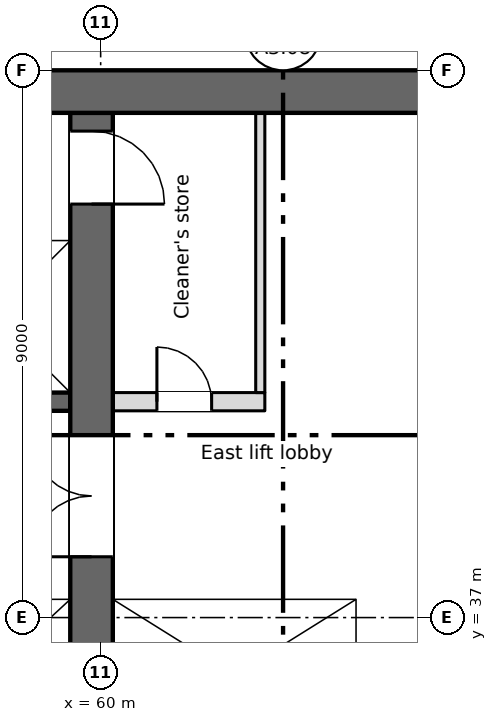
"""IFC4 building model, lengths in metres.
Left out: names, types, materials, properties, quantities, classifications, styles, units other than length and angle.
Written with IfcOpenShell. Run it as: python <this file> out.ifc"""

import sys

from ifc_helpers import new_model, si_unit, direction, frame, frame_2d, origin, place, context, subcontext, project, spatial, rectangle, extrude, element, fill, save


model = new_model("IFC4")
c1 = context("Model", 3, precision=1e-05, world=origin(), true_north=direction((0.0, 1.0)))
c2 = subcontext(c1, "Body", "Model", "MODEL_VIEW")
j1 = project(units=[si_unit("LENGTHUNIT", "METRE"), si_unit("PLANEANGLEUNIT", "RADIAN")], contexts=[c1])
p1 = place(None, origin())
s1 = spatial("IfcSite", under=j1, at=p1, CompositionType="ELEMENT")
p2 = place(p1, origin())
s2 = spatial("IfcBuilding", under=s1, at=p2, CompositionType="ELEMENT")
p3 = place(p2, frame((0.0, 0.0, 211.75)))
s3 = spatial("IfcBuildingStorey", under=s2, at=p3, CompositionType="ELEMENT", Elevation=211.75)
p4 = place(p3, frame((11.55, 45.65, 0.0), z_axis=(0.0, 0.0, 1.0), x_axis=(1.0, 0.0, 0.0)))
e1 = element("IfcWall", 1, at=p4, inside=s3, PredefinedType="SHEAR", context=c2, shape_type="SweptSolid", body=[
    extrude(rectangle(XDim=54.9, YDim=0.7, at=frame_2d((27.45, 0.0))), origin(), (0.0, 0.0, 1.0), 3.35),
])
p5 = place(p3, frame((64.35, 34.8, 0.0), z_axis=(0.0, 0.0, 1.0), x_axis=(0.0, 1.0, 0.0)))
e2 = element("IfcWall", 2, at=p5, inside=s3, PredefinedType="SHEAR", context=c2, shape_type="SweptSolid", body=[
    extrude(rectangle(XDim=10.5, YDim=0.3, at=frame_2d((5.25, 0.0))), origin(), (0.0, 0.0, 1.0), 3.35),
])
p6 = place(p3, frame((59.85, 28.4, 0.0), z_axis=(0.0, 0.0, 1.0), x_axis=(0.0, 1.0, 0.0)))
e3 = element("IfcWall", 3, at=p6, inside=s3, PredefinedType="SHEAR", context=c2, shape_type="SweptSolid", body=[
    extrude(rectangle(XDim=16.9, YDim=0.7, at=frame_2d((8.45, 0.0))), origin(), (0.0, 0.0, 1.0), 3.35),
])
p7 = place(p6, frame((9.6, 0.0, 0.0)))
e4 = element("IfcOpeningElement", 4, at=p7, cuts=e3, PredefinedType="OPENING", context=c2, shape_type="SweptSolid", body=[
    extrude(rectangle(XDim=2.0, YDim=2.1, at=frame_2d((1.0, 1.05))), frame((0.0, 0.36, 0.0), z_axis=(0.0, -1.0, 0.0), x_axis=(1.0, 0.0, 0.0)), (0.0, 0.0, 1.0), 0.72),
])
p8 = place(p6, frame((15.4, 0.0, 0.0)))
e5 = element("IfcOpeningElement", 5, at=p8, cuts=e3, PredefinedType="OPENING", context=c2, shape_type="SweptSolid", body=[
    extrude(rectangle(XDim=1.2, YDim=2.1, at=frame_2d((0.6, 1.05))), frame((0.0, 0.36, 0.0), z_axis=(0.0, -1.0, 0.0), x_axis=(1.0, 0.0, 0.0)), (0.0, 0.0, 1.0), 0.72),
])
p9 = place(p3, frame((47.3, 37.45, 0.0), z_axis=(0.0, 0.0, 1.0), x_axis=(1.0, 0.0, 0.0)))
e6 = element("IfcWall", 6, at=p9, inside=s3, PredefinedType="SHEAR", context=c2, shape_type="SweptSolid", body=[
    extrude(rectangle(XDim=12.2, YDim=0.3, at=frame_2d((6.1, 0.0))), origin(), (0.0, 0.0, 1.0), 3.35),
])
p10 = place(p9, frame((4.3, 0.0, 0.0)))
e7 = element("IfcOpeningElement", 7, at=p10, cuts=e6, PredefinedType="OPENING", context=c2, shape_type="SweptSolid", body=[
    extrude(rectangle(XDim=1.1, YDim=2.1, at=frame_2d((0.55, 1.05))), frame((0.0, 0.16, 0.0), z_axis=(0.0, -1.0, 0.0), x_axis=(1.0, 0.0, 0.0)), (0.0, 0.0, 1.0), 0.32),
])
p11 = place(p9, frame((7.3, 0.0, 0.0)))
e8 = element("IfcOpeningElement", 8, at=p11, cuts=e6, PredefinedType="OPENING", context=c2, shape_type="SweptSolid", body=[
    extrude(rectangle(XDim=1.1, YDim=2.1, at=frame_2d((0.55, 1.05))), frame((0.0, 0.16, 0.0), z_axis=(0.0, -1.0, 0.0), x_axis=(1.0, 0.0, 0.0)), (0.0, 0.0, 1.0), 0.32),
])
p12 = place(p9, frame((10.3, 0.0, 0.0)))
e9 = element("IfcOpeningElement", 9, at=p12, cuts=e6, PredefinedType="OPENING", context=c2, shape_type="SweptSolid", body=[
    extrude(rectangle(XDim=1.1, YDim=2.1, at=frame_2d((0.55, 1.05))), frame((0.0, 0.16, 0.0), z_axis=(0.0, -1.0, 0.0), x_axis=(1.0, 0.0, 0.0)), (0.0, 0.0, 1.0), 0.32),
])
p13 = place(p3, frame((60.2, 37.45, 0.0), z_axis=(0.0, 0.0, 1.0), x_axis=(1.0, 0.0, 0.0)))
e10 = element("IfcWall", 10, at=p13, inside=s3, PredefinedType="SHEAR", context=c2, shape_type="SweptSolid", body=[
    extrude(rectangle(XDim=4.0, YDim=0.3, at=frame_2d((2.0, 0.0))), origin(), (0.0, 0.0, 1.0), 3.35),
])
p14 = place(p13, frame((1.45, 0.0, 0.0)))
e11 = element("IfcOpeningElement", 11, at=p14, cuts=e10, PredefinedType="OPENING", context=c2, shape_type="SweptSolid", body=[
    extrude(rectangle(XDim=1.1, YDim=2.1, at=frame_2d((0.55, 1.05))), frame((0.0, 0.16, 0.0), z_axis=(0.0, -1.0, 0.0), x_axis=(1.0, 0.0, 0.0)), (0.0, 0.0, 1.0), 0.32),
])
p15 = place(p3, frame((18.5, 40.55, 0.0), z_axis=(0.0, 0.0, 1.0), x_axis=(1.0, 0.0, 0.0)))
e12 = element("IfcWall", 12, at=p15, inside=s3, PredefinedType="SHEAR", context=c2, shape_type="SweptSolid", body=[
    extrude(rectangle(XDim=41.0, YDim=0.3, at=frame_2d((20.5, 0.0))), origin(), (0.0, 0.0, 1.0), 3.35),
])
p16 = place(p15, frame((2.15, 0.0, 0.0)))
e13 = element("IfcOpeningElement", 13, at=p16, cuts=e12, PredefinedType="OPENING", context=c2, shape_type="SweptSolid", body=[
    extrude(rectangle(XDim=0.9, YDim=2.1, at=frame_2d((0.45, 1.05))), frame((0.0, 0.16, 0.0), z_axis=(0.0, -1.0, 0.0), x_axis=(1.0, 0.0, 0.0)), (0.0, 0.0, 1.0), 0.32),
])
p17 = place(p15, frame((15.9, 0.0, 0.0)))
e14 = element("IfcOpeningElement", 14, at=p17, cuts=e12, PredefinedType="OPENING", context=c2, shape_type="SweptSolid", body=[
    extrude(rectangle(XDim=0.9, YDim=2.1, at=frame_2d((0.45, 1.05))), frame((0.0, 0.16, 0.0), z_axis=(0.0, -1.0, 0.0), x_axis=(1.0, 0.0, 0.0)), (0.0, 0.0, 1.0), 0.32),
])
p18 = place(p15, frame((21.4, 0.0, 0.0)))
e15 = element("IfcOpeningElement", 15, at=p18, cuts=e12, PredefinedType="OPENING", context=c2, shape_type="SweptSolid", body=[
    extrude(rectangle(XDim=0.9, YDim=2.1, at=frame_2d((0.45, 1.05))), frame((0.0, 0.16, 0.0), z_axis=(0.0, -1.0, 0.0), x_axis=(1.0, 0.0, 0.0)), (0.0, 0.0, 1.0), 0.32),
])
p19 = place(p15, frame((26.9, 0.0, 0.0)))
e16 = element("IfcOpeningElement", 16, at=p19, cuts=e12, PredefinedType="OPENING", context=c2, shape_type="SweptSolid", body=[
    extrude(rectangle(XDim=0.9, YDim=2.1, at=frame_2d((0.45, 1.05))), frame((0.0, 0.16, 0.0), z_axis=(0.0, -1.0, 0.0), x_axis=(1.0, 0.0, 0.0)), (0.0, 0.0, 1.0), 0.32),
])
p20 = place(p15, frame((6.175, 0.0, 0.0)))
e17 = element("IfcOpeningElement", 17, at=p20, cuts=e12, PredefinedType="OPENING", context=c2, shape_type="SweptSolid", body=[
    extrude(rectangle(XDim=1.1, YDim=2.1, at=frame_2d((0.55, 1.05))), frame((0.0, 0.16, 0.0), z_axis=(0.0, -1.0, 0.0), x_axis=(1.0, 0.0, 0.0)), (0.0, 0.0, 1.0), 0.32),
])
p21 = place(p15, frame((8.925, 0.0, 0.0)))
e18 = element("IfcOpeningElement", 18, at=p21, cuts=e12, PredefinedType="OPENING", context=c2, shape_type="SweptSolid", body=[
    extrude(rectangle(XDim=1.1, YDim=2.1, at=frame_2d((0.55, 1.05))), frame((0.0, 0.16, 0.0), z_axis=(0.0, -1.0, 0.0), x_axis=(1.0, 0.0, 0.0)), (0.0, 0.0, 1.0), 0.32),
])
p22 = place(p15, frame((11.675, 0.0, 0.0)))
e19 = element("IfcOpeningElement", 19, at=p22, cuts=e12, PredefinedType="OPENING", context=c2, shape_type="SweptSolid", body=[
    extrude(rectangle(XDim=1.1, YDim=2.1, at=frame_2d((0.55, 1.05))), frame((0.0, 0.16, 0.0), z_axis=(0.0, -1.0, 0.0), x_axis=(1.0, 0.0, 0.0)), (0.0, 0.0, 1.0), 0.32),
])
p23 = place(p15, frame((30.925, 0.0, 0.0)))
e20 = element("IfcOpeningElement", 20, at=p23, cuts=e12, PredefinedType="OPENING", context=c2, shape_type="SweptSolid", body=[
    extrude(rectangle(XDim=1.1, YDim=2.1, at=frame_2d((0.55, 1.05))), frame((0.0, 0.16, 0.0), z_axis=(0.0, -1.0, 0.0), x_axis=(1.0, 0.0, 0.0)), (0.0, 0.0, 1.0), 0.32),
])
p24 = place(p15, frame((33.675, 0.0, 0.0)))
e21 = element("IfcOpeningElement", 21, at=p24, cuts=e12, PredefinedType="OPENING", context=c2, shape_type="SweptSolid", body=[
    extrude(rectangle(XDim=1.1, YDim=2.1, at=frame_2d((0.55, 1.05))), frame((0.0, 0.16, 0.0), z_axis=(0.0, -1.0, 0.0), x_axis=(1.0, 0.0, 0.0)), (0.0, 0.0, 1.0), 0.32),
])
p25 = place(p15, frame((36.375, 0.0, 0.0)))
e22 = element("IfcOpeningElement", 22, at=p25, cuts=e12, PredefinedType="OPENING", context=c2, shape_type="SweptSolid", body=[
    extrude(rectangle(XDim=1.2, YDim=2.1, at=frame_2d((0.6, 1.05))), frame((0.0, 0.16, 0.0), z_axis=(0.0, -1.0, 0.0), x_axis=(1.0, 0.0, 0.0)), (0.0, 0.0, 1.0), 0.32),
])
p26 = place(p15, frame((39.15, 0.0, 0.0)))
e23 = element("IfcOpeningElement", 23, at=p26, cuts=e12, PredefinedType="OPENING", context=c2, shape_type="SweptSolid", body=[
    extrude(rectangle(XDim=1.2, YDim=2.1, at=frame_2d((0.6, 1.05))), frame((0.0, 0.16, 0.0), z_axis=(0.0, -1.0, 0.0), x_axis=(1.0, 0.0, 0.0)), (0.0, 0.0, 1.0), 0.32),
])
p27 = place(p3, frame((18.5, 43.35, 0.0), z_axis=(0.0, 0.0, 1.0), x_axis=(1.0, 0.0, 0.0)))
e24 = element("IfcWall", 24, at=p27, inside=s3, PredefinedType="SHEAR", context=c2, shape_type="SweptSolid", body=[
    extrude(rectangle(XDim=41.0, YDim=0.3, at=frame_2d((20.5, 0.0))), origin(), (0.0, 0.0, 1.0), 3.35),
])
p28 = place(p3, frame((60.2, 40.55, 0.0), z_axis=(0.0, 0.0, 1.0), x_axis=(1.0, 0.0, 0.0)))
e25 = element("IfcWall", 25, at=p28, inside=s3, PredefinedType="PARTITIONING", context=c2, shape_type="SweptSolid", body=[
    extrude(rectangle(XDim=2.5, YDim=0.3, at=frame_2d((1.25, 0.0))), origin(), (0.0, 0.0, 1.0), 3.35),
])
p29 = place(p28, frame((0.725, 0.0, 0.0)))
e26 = element("IfcOpeningElement", 26, at=p29, cuts=e25, PredefinedType="OPENING", context=c2, shape_type="SweptSolid", body=[
    extrude(rectangle(XDim=0.9, YDim=2.1, at=frame_2d((0.45, 1.05))), frame((0.0, 0.16, 0.0), z_axis=(0.0, -1.0, 0.0), x_axis=(1.0, 0.0, 0.0)), (0.0, 0.0, 1.0), 0.32),
])
p30 = place(p3, frame((62.625, 40.7, 0.0), z_axis=(0.0, 0.0, 1.0), x_axis=(0.0, 1.0, 0.0)))
e27 = element("IfcWall", 27, at=p30, inside=s3, PredefinedType="PARTITIONING", context=c2, shape_type="SweptSolid", body=[
    extrude(rectangle(XDim=4.6, YDim=0.15, at=frame_2d((2.3, 0.0))), origin(), (0.0, 0.0, 1.0), 3.35),
])
p31 = place(p29, origin())
e28 = element("IfcDoor", 28, at=p31, inside=s3, OperationType="SINGLE_SWING_LEFT", PredefinedType="DOOR", context=c2, shape_type="SweptSolid", body=[
    extrude(rectangle(XDim=0.9, YDim=2.1, at=frame_2d((0.45, 1.05))), frame((0.0, 0.025, 0.0), z_axis=(0.0, -1.0, 0.0), x_axis=(1.0, 0.0, 0.0)), (0.0, 0.0, 1.0), 0.05),
])
fill(e26, e28)
p32 = place(p14, origin())
e29 = element("IfcDoor", 29, at=p32, inside=s3, OperationType="SLIDING_TO_LEFT", PredefinedType="DOOR", context=c2, shape_type="SweptSolid", body=[
    extrude(rectangle(XDim=1.1, YDim=2.1, at=frame_2d((0.55, 1.05))), frame((0.0, 0.025, 0.0), z_axis=(0.0, -1.0, 0.0), x_axis=(1.0, 0.0, 0.0)), (0.0, 0.0, 1.0), 0.05),
])
fill(e11, e29)
p33 = place(p7, origin())
e30 = element("IfcDoor", 30, at=p33, inside=s3, OperationType="DOUBLE_DOOR_SINGLE_SWING", PredefinedType="DOOR", context=c2, shape_type="SweptSolid", body=[
    extrude(rectangle(XDim=2.0, YDim=2.1, at=frame_2d((1.0, 1.05))), frame((0.0, 0.025, 0.0), z_axis=(0.0, -1.0, 0.0), x_axis=(1.0, 0.0, 0.0)), (0.0, 0.0, 1.0), 0.05),
])
fill(e4, e30)
p34 = place(p8, origin())
e31 = element("IfcDoor", 31, at=p34, inside=s3, OperationType="SINGLE_SWING_LEFT", PredefinedType="DOOR", context=c2, shape_type="SweptSolid", body=[
    extrude(rectangle(XDim=1.2, YDim=2.1, at=frame_2d((0.6, 1.05))), frame((0.0, 0.025, 0.0), z_axis=(0.0, -1.0, 0.0), x_axis=(1.0, 0.0, 0.0)), (0.0, 0.0, 1.0), 0.05),
])
fill(e5, e31)
save(model, sys.argv[1])
